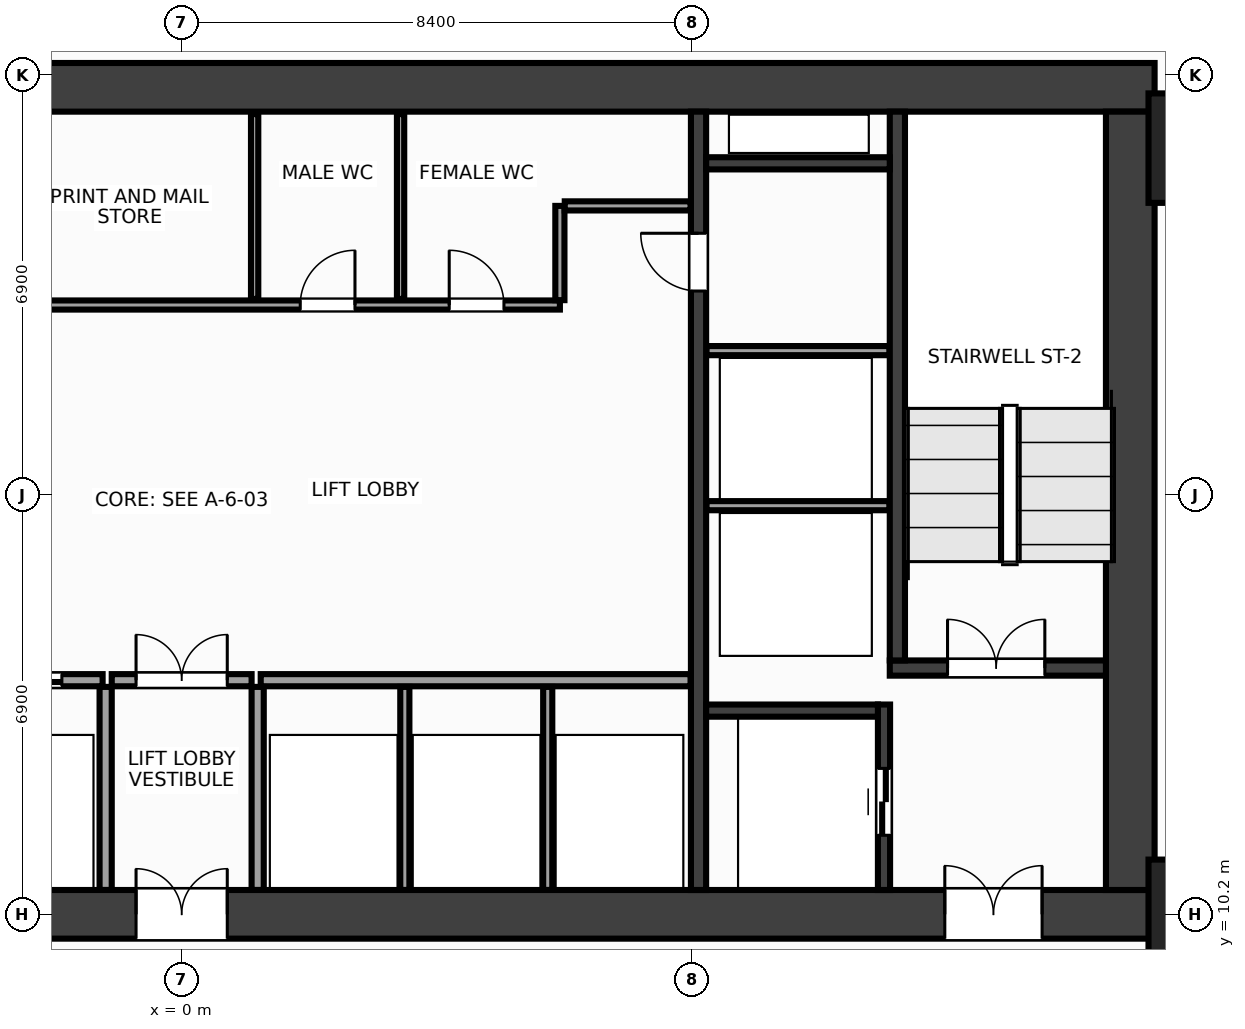
"""IFC4 building model, lengths in metres.
Left out: names, types, materials, properties, quantities, classifications, styles, units other than length and angle.
Written with IfcOpenShell. Run it as: python <this file> out.ifc"""

import sys

from ifc_helpers import new_model, si_unit, direction, frame, frame_2d, origin, origin_2d, place, context, subcontext, project, spatial, rectangle, extrude, source, transform, mapped, element, fill, save


model = new_model("IFC4")
c1 = context("Model", 3, precision=1e-05, world=origin(), true_north=direction((0.0, 1.0)))
c2 = subcontext(c1, "Body", "Model", "MODEL_VIEW")
j1 = project(units=[si_unit("LENGTHUNIT", "METRE"), si_unit("PLANEANGLEUNIT", "RADIAN")], contexts=[c1])
p1 = place(None, origin())
s1 = spatial("IfcSite", under=j1, at=p1, CompositionType="ELEMENT")
p2 = place(p1, origin())
s2 = spatial("IfcBuilding", under=s1, at=p2, CompositionType="ELEMENT")
p3 = place(p2, frame((0.0, 0.0, 45.2)))
s3 = spatial("IfcBuildingStorey", under=s2, at=p3, CompositionType="ELEMENT", Elevation=45.2)
m1 = source(origin(), c2, "Body", "SweptSolid", [
    extrude(rectangle(XDim=32.0, YDim=0.8, at=frame_2d((16.0, 0.0))), origin(), (0.0, 0.0, 1.0), 3.6),
])
p4 = place(p3, frame((-16.0, 23.8, 0.0), z_axis=(0.0, 0.0, 1.0), x_axis=(1.0, 0.0, 0.0)))
e1 = element("IfcWall", 1, at=p4, inside=s3, PredefinedType="SHEAR", context=c2, shape_type="MappedRepresentation", body=[
    mapped(m1, transform((0.0, 0.0, 0.0), x_axis=(1.0, 0.0, 0.0), y_axis=(0.0, 1.0, 0.0), z_axis=(0.0, 0.0, 1.0), scale=1.0)),
])
p5 = place(p3, frame((-16.0, 10.2, 0.0), z_axis=(0.0, 0.0, 1.0), x_axis=(1.0, 0.0, 0.0)))
e2 = element("IfcWall", 2, at=p5, inside=s3, PredefinedType="SHEAR", context=c2, shape_type="MappedRepresentation", body=[
    mapped(m1, transform((0.0, 0.0, 0.0), x_axis=(1.0, 0.0, 0.0), y_axis=(0.0, 1.0, 0.0), z_axis=(0.0, 0.0, 1.0), scale=1.0)),
])
p6 = place(p5, frame((1.85, 0.0, 0.0)))
e3 = element("IfcOpeningElement", 3, at=p6, cuts=e2, PredefinedType="OPENING", context=c2, shape_type="SweptSolid", body=[
    extrude(rectangle(XDim=1.6, YDim=2.15, at=frame_2d((0.8, 1.075))), frame((0.0, 0.412, 0.0), z_axis=(0.0, -1.0, 0.0), x_axis=(1.0, 0.0, 0.0)), (0.0, 0.0, 1.0), 0.824),
])
p7 = place(p5, frame((28.55, 0.0, 0.0)))
e4 = element("IfcOpeningElement", 4, at=p7, cuts=e2, PredefinedType="OPENING", context=c2, shape_type="SweptSolid", body=[
    extrude(rectangle(XDim=1.6, YDim=2.15, at=frame_2d((0.8, 1.075))), frame((0.0, 0.412, 0.0), z_axis=(0.0, -1.0, 0.0), x_axis=(1.0, 0.0, 0.0)), (0.0, 0.0, 1.0), 0.824),
])
p8 = place(p5, frame((15.25, 0.0, 0.0)))
e5 = element("IfcOpeningElement", 5, at=p8, cuts=e2, PredefinedType="OPENING", context=c2, shape_type="SweptSolid", body=[
    extrude(rectangle(XDim=1.5, YDim=2.2, at=frame_2d((0.75, 1.1))), frame((0.0, 0.412, 0.0), z_axis=(0.0, -1.0, 0.0), x_axis=(1.0, 0.0, 0.0)), (0.0, 0.0, 1.0), 0.824),
])
m2 = source(origin(), c2, "Body", "SweptSolid", [
    extrude(rectangle(XDim=12.8, YDim=0.8, at=frame_2d((6.4, 0.0))), origin(), (0.0, 0.0, 1.0), 3.6),
])
p9 = place(p3, frame((15.6, 10.6, 0.0), z_axis=(0.0, 0.0, 1.0), x_axis=(0.0, 1.0, 0.0)))
e6 = element("IfcWall", 6, at=p9, inside=s3, PredefinedType="SHEAR", context=c2, shape_type="MappedRepresentation", body=[
    mapped(m2, transform((0.0, 0.0, 0.0), x_axis=(1.0, 0.0, 0.0), y_axis=(0.0, 1.0, 0.0), z_axis=(0.0, 0.0, 1.0), scale=1.0)),
])
m3 = source(origin(), c2, "Body", "SweptSolid", [
    extrude(rectangle(XDim=12.8, YDim=0.25, at=frame_2d((6.4, 0.0))), origin(), (0.0, 0.0, 1.0), 3.6),
])
p10 = place(p3, frame((8.5, 10.6, 0.0), z_axis=(0.0, 0.0, 1.0), x_axis=(0.0, 1.0, 0.0)))
e7 = element("IfcWall", 7, at=p10, inside=s3, PredefinedType="SHEAR", context=c2, shape_type="MappedRepresentation", body=[
    mapped(m3, transform((0.0, 0.0, 0.0), x_axis=(1.0, 0.0, 0.0), y_axis=(0.0, 1.0, 0.0), z_axis=(0.0, 0.0, 1.0), scale=1.0)),
])
p11 = place(p10, frame((9.85, 0.0, 0.0)))
e8 = element("IfcOpeningElement", 8, at=p11, cuts=e7, PredefinedType="OPENING", context=c2, shape_type="SweptSolid", body=[
    extrude(rectangle(XDim=0.95, YDim=2.15, at=frame_2d((0.475, 1.075))), frame((0.0, 0.137, 0.0), z_axis=(0.0, -1.0, 0.0), x_axis=(1.0, 0.0, 0.0)), (0.0, 0.0, 1.0), 0.274),
])
m4 = source(origin(), c2, "Body", "SweptSolid", [
    extrude(rectangle(XDim=3.555, YDim=0.25, at=frame_2d((1.777, 0.0))), origin(), (0.0, 0.0, 1.0), 3.6),
])
p12 = place(p3, frame((11.645, 14.25, 0.0), z_axis=(0.0, 0.0, 1.0), x_axis=(1.0, 0.0, 0.0)))
e9 = element("IfcWall", 9, at=p12, inside=s3, PredefinedType="SHEAR", context=c2, shape_type="MappedRepresentation", body=[
    mapped(m4, transform((0.0, 0.0, 0.0), x_axis=(1.0, 0.0, 0.0), y_axis=(0.0, 1.0, 0.0), z_axis=(0.0, 0.0, 1.0), scale=1.0)),
])
p13 = place(p12, frame((0.95, 0.0, 0.0)))
e10 = element("IfcOpeningElement", 10, at=p13, cuts=e9, PredefinedType="OPENING", context=c2, shape_type="SweptSolid", body=[
    extrude(rectangle(XDim=1.6, YDim=2.15, at=frame_2d((0.8, 1.075))), frame((0.0, 0.137, 0.0), z_axis=(0.0, -1.0, 0.0), x_axis=(1.0, 0.0, 0.0)), (0.0, 0.0, 1.0), 0.274),
])
m5 = source(origin(), c2, "Body", "SweptSolid", [
    extrude(rectangle(XDim=9.025, YDim=0.25, at=frame_2d((4.512, 0.0))), origin(), (0.0, 0.0, 1.0), 3.6),
])
p14 = place(p3, frame((11.77, 14.375, 0.0), z_axis=(0.0, 0.0, 1.0), x_axis=(0.0, 1.0, 0.0)))
e11 = element("IfcWall", 11, at=p14, inside=s3, PredefinedType="SHEAR", context=c2, shape_type="MappedRepresentation", body=[
    mapped(m5, transform((0.0, 0.0, 0.0), x_axis=(1.0, 0.0, 0.0), y_axis=(0.0, 1.0, 0.0), z_axis=(0.0, 0.0, 1.0), scale=1.0)),
])
m6 = source(origin(), c2, "Body", "SweptSolid", [
    extrude(rectangle(XDim=3.05, YDim=0.2, at=frame_2d((1.525, 0.0))), origin(), (0.0, 0.0, 1.0), 3.6),
])
p15 = place(p3, frame((11.55, 10.6, 0.0), z_axis=(0.0, 0.0, 1.0), x_axis=(0.0, 1.0, 0.0)))
e12 = element("IfcWall", 12, at=p15, inside=s3, PredefinedType="SHEAR", context=c2, shape_type="MappedRepresentation", body=[
    mapped(m6, transform((0.0, 0.0, 0.0), x_axis=(1.0, 0.0, 0.0), y_axis=(0.0, 1.0, 0.0), z_axis=(0.0, 0.0, 1.0), scale=1.0)),
])
p16 = place(p15, frame((0.9, 0.0, 0.0)))
e13 = element("IfcOpeningElement", 13, at=p16, cuts=e12, PredefinedType="OPENING", context=c2, shape_type="SweptSolid", body=[
    extrude(rectangle(XDim=1.1, YDim=2.15, at=frame_2d((0.55, 1.075))), frame((0.0, 0.112, 0.0), z_axis=(0.0, -1.0, 0.0), x_axis=(1.0, 0.0, 0.0)), (0.0, 0.0, 1.0), 0.224),
])
m7 = source(origin(), c2, "Body", "SweptSolid", [
    extrude(rectangle(XDim=2.825, YDim=0.2, at=frame_2d((1.413, 0.0))), origin(), (0.0, 0.0, 1.0), 3.6),
])
p17 = place(p3, frame((8.625, 13.55, 0.0), z_axis=(0.0, 0.0, 1.0), x_axis=(1.0, 0.0, 0.0)))
e14 = element("IfcWall", 14, at=p17, inside=s3, PredefinedType="SHEAR", context=c2, shape_type="MappedRepresentation", body=[
    mapped(m7, transform((0.0, 0.0, 0.0), x_axis=(1.0, 0.0, 0.0), y_axis=(0.0, 1.0, 0.0), z_axis=(0.0, 0.0, 1.0), scale=1.0)),
])
m8 = source(origin(), c2, "Body", "SweptSolid", [
    extrude(rectangle(XDim=3.02, YDim=0.2, at=frame_2d((1.51, 0.0))), origin(), (0.0, 0.0, 1.0), 3.6),
])
p18 = place(p3, frame((8.625, 22.55, 0.0), z_axis=(0.0, 0.0, 1.0), x_axis=(1.0, 0.0, 0.0)))
e15 = element("IfcWall", 15, at=p18, inside=s3, PredefinedType="SHEAR", context=c2, shape_type="MappedRepresentation", body=[
    mapped(m8, transform((0.0, 0.0, 0.0), x_axis=(1.0, 0.0, 0.0), y_axis=(0.0, 1.0, 0.0), z_axis=(0.0, 0.0, 1.0), scale=1.0)),
])
m9 = source(origin(), c2, "Body", "SweptSolid", [
    extrude(rectangle(XDim=1.8, YDim=1.8, at=origin_2d()), origin(), (0.0, 0.0, 1.0), 3.6),
])
for number, where, z_axis, x_axis in (
    (16, (16.8, 10.2, 0.0), (0.0, 0.0, 1.0), (1.0, 0.0, 0.0)),
    (17, (16.8, 22.8, 0.0), (0.0, 0.0, 1.0), (1.0, 0.0, 0.0)),
):
    element("IfcColumn", number, at=place(p3, frame(where, z_axis=z_axis, x_axis=x_axis)), inside=s3, PredefinedType="COLUMN", context=c2, shape_type="MappedRepresentation", body=[
        mapped(m9, transform((0.0, 0.0, 0.0), x_axis=(1.0, 0.0, 0.0), y_axis=(0.0, 1.0, 0.0), z_axis=(0.0, 0.0, 1.0), scale=1.0)),
    ])
m10 = source(origin(), c2, "Body", "SweptSolid", [
    extrude(rectangle(XDim=3.01, YDim=0.15, at=frame_2d((1.505, 0.0))), origin(), (0.0, 0.0, 1.0), 3.36),
])
for number, where, z_axis, x_axis in (
    (18, (8.63, 16.92, 0.0), (0.0, 0.0, 1.0), (1.0, 0.0, 0.0)),
    (19, (8.63, 19.47, 0.0), (0.0, 0.0, 1.0), (1.0, 0.0, 0.0)),
):
    element("IfcWall", number, at=place(p3, frame(where, z_axis=z_axis, x_axis=x_axis)), inside=s3, PredefinedType="PARTITIONING", context=c2, shape_type="MappedRepresentation", body=[
        mapped(m10, transform((0.0, 0.0, 0.0), x_axis=(1.0, 0.0, 0.0), y_axis=(0.0, 1.0, 0.0), z_axis=(0.0, 0.0, 1.0), scale=1.0)),
    ])
m11 = source(origin(), c2, "Body", "SweptSolid", [
    extrude(rectangle(XDim=7.07, YDim=0.2, at=frame_2d((3.535, 0.0))), origin(), (0.0, 0.0, 1.0), 3.36),
])
p19 = place(p3, frame((-8.37, 14.05, 0.0), z_axis=(0.0, 0.0, 1.0), x_axis=(1.0, 0.0, 0.0)))
e20 = element("IfcWall", 20, at=p19, inside=s3, PredefinedType="PARTITIONING", context=c2, shape_type="MappedRepresentation", body=[
    mapped(m11, transform((0.0, 0.0, 0.0), x_axis=(1.0, 0.0, 0.0), y_axis=(0.0, 1.0, 0.0), z_axis=(0.0, 0.0, 1.0), scale=1.0)),
])
p20 = place(p19, frame((0.6, 0.0, 0.0)))
e21 = element("IfcOpeningElement", 21, at=p20, cuts=e20, PredefinedType="OPENING", context=c2, shape_type="SweptSolid", body=[
    extrude(rectangle(XDim=1.1, YDim=2.15, at=frame_2d((0.55, 1.075))), frame((0.0, 0.112, 0.0), z_axis=(0.0, -1.0, 0.0), x_axis=(1.0, 0.0, 0.0)), (0.0, 0.0, 1.0), 0.224),
])
p21 = place(p19, frame((2.95, 0.0, 0.0)))
e22 = element("IfcOpeningElement", 22, at=p21, cuts=e20, PredefinedType="OPENING", context=c2, shape_type="SweptSolid", body=[
    extrude(rectangle(XDim=1.1, YDim=2.15, at=frame_2d((0.55, 1.075))), frame((0.0, 0.112, 0.0), z_axis=(0.0, -1.0, 0.0), x_axis=(1.0, 0.0, 0.0)), (0.0, 0.0, 1.0), 0.224),
])
p22 = place(p19, frame((5.3, 0.0, 0.0)))
e23 = element("IfcOpeningElement", 23, at=p22, cuts=e20, PredefinedType="OPENING", context=c2, shape_type="SweptSolid", body=[
    extrude(rectangle(XDim=1.1, YDim=2.15, at=frame_2d((0.55, 1.075))), frame((0.0, 0.112, 0.0), z_axis=(0.0, -1.0, 0.0), x_axis=(1.0, 0.0, 0.0)), (0.0, 0.0, 1.0), 0.224),
])
p23 = place(p3, frame((1.3, 14.05, 0.0), z_axis=(0.0, 0.0, 1.0), x_axis=(1.0, 0.0, 0.0)))
e24 = element("IfcWall", 24, at=p23, inside=s3, PredefinedType="PARTITIONING", context=c2, shape_type="MappedRepresentation", body=[
    mapped(m11, transform((0.0, 0.0, 0.0), x_axis=(1.0, 0.0, 0.0), y_axis=(0.0, 1.0, 0.0), z_axis=(0.0, 0.0, 1.0), scale=1.0)),
])
m12 = source(origin(), c2, "Body", "SweptSolid", [
    extrude(rectangle(XDim=3.34, YDim=0.2, at=frame_2d((1.67, 0.0))), origin(), (0.0, 0.0, 1.0), 3.36),
])
for number, where, z_axis, x_axis in (
    (25, (-1.25, 10.6, 0.0), (0.0, 0.0, 1.0), (0.0, 1.0, 0.0)),
    (26, (1.25, 10.6, 0.0), (0.0, 0.0, 1.0), (0.0, 1.0, 0.0)),
):
    element("IfcWall", number, at=place(p3, frame(where, z_axis=z_axis, x_axis=x_axis)), inside=s3, PredefinedType="PARTITIONING", context=c2, shape_type="MappedRepresentation", body=[
        mapped(m12, transform((0.0, 0.0, 0.0), x_axis=(1.0, 0.0, 0.0), y_axis=(0.0, 1.0, 0.0), z_axis=(0.0, 0.0, 1.0), scale=1.0)),
    ])
m13 = source(origin(), c2, "Body", "SweptSolid", [
    extrude(rectangle(XDim=2.3, YDim=0.2, at=frame_2d((1.15, 0.0))), origin(), (0.0, 0.0, 1.0), 3.36),
])
p24 = place(p3, frame((-1.15, 14.05, 0.0), z_axis=(0.0, 0.0, 1.0), x_axis=(1.0, 0.0, 0.0)))
e27 = element("IfcWall", 27, at=p24, inside=s3, PredefinedType="PARTITIONING", context=c2, shape_type="MappedRepresentation", body=[
    mapped(m13, transform((0.0, 0.0, 0.0), x_axis=(1.0, 0.0, 0.0), y_axis=(0.0, 1.0, 0.0), z_axis=(0.0, 0.0, 1.0), scale=1.0)),
])
p25 = place(p24, frame((0.4, 0.0, 0.0)))
e28 = element("IfcOpeningElement", 28, at=p25, cuts=e27, PredefinedType="OPENING", context=c2, shape_type="SweptSolid", body=[
    extrude(rectangle(XDim=1.5, YDim=2.2, at=frame_2d((0.75, 1.1))), frame((0.0, 0.112, 0.0), z_axis=(0.0, -1.0, 0.0), x_axis=(1.0, 0.0, 0.0)), (0.0, 0.0, 1.0), 0.224),
])
m14 = source(origin(), c2, "Body", "SweptSolid", [
    extrude(rectangle(XDim=14.59, YDim=0.15, at=frame_2d((7.295, 0.0))), origin(), (0.0, 0.0, 1.0), 3.36),
])
p26 = place(p3, frame((-8.37, 20.22, 0.0), z_axis=(0.0, 0.0, 1.0), x_axis=(1.0, 0.0, 0.0)))
e29 = element("IfcWall", 29, at=p26, inside=s3, PredefinedType="PARTITIONING", context=c2, shape_type="MappedRepresentation", body=[
    mapped(m14, transform((0.0, 0.0, 0.0), x_axis=(1.0, 0.0, 0.0), y_axis=(0.0, 1.0, 0.0), z_axis=(0.0, 0.0, 1.0), scale=1.0)),
])
p27 = place(p26, frame((4.36, 0.0, 0.0)))
e30 = element("IfcOpeningElement", 30, at=p27, cuts=e29, PredefinedType="OPENING", context=c2, shape_type="SweptSolid", body=[
    extrude(rectangle(XDim=0.9, YDim=2.15, at=frame_2d((0.45, 1.075))), frame((0.0, 0.087, 0.0), z_axis=(0.0, -1.0, 0.0), x_axis=(1.0, 0.0, 0.0)), (0.0, 0.0, 1.0), 0.174),
])
p28 = place(p26, frame((10.32, 0.0, 0.0)))
e31 = element("IfcOpeningElement", 31, at=p28, cuts=e29, PredefinedType="OPENING", context=c2, shape_type="SweptSolid", body=[
    extrude(rectangle(XDim=0.9, YDim=2.15, at=frame_2d((0.45, 1.075))), frame((0.0, 0.087, 0.0), z_axis=(0.0, -1.0, 0.0), x_axis=(1.0, 0.0, 0.0)), (0.0, 0.0, 1.0), 0.174),
])
p29 = place(p26, frame((12.77, 0.0, 0.0)))
e32 = element("IfcOpeningElement", 32, at=p29, cuts=e29, PredefinedType="OPENING", context=c2, shape_type="SweptSolid", body=[
    extrude(rectangle(XDim=0.9, YDim=2.15, at=frame_2d((0.45, 1.075))), frame((0.0, 0.087, 0.0), z_axis=(0.0, -1.0, 0.0), x_axis=(1.0, 0.0, 0.0)), (0.0, 0.0, 1.0), 0.174),
])
m15 = source(origin(), c2, "Body", "SweptSolid", [
    extrude(rectangle(XDim=1.55, YDim=0.15, at=frame_2d((0.775, 0.0))), origin(), (0.0, 0.0, 1.0), 3.36),
])
p30 = place(p3, frame((6.22, 20.3, 0.0), z_axis=(0.0, 0.0, 1.0), x_axis=(0.0, 1.0, 0.0)))
e33 = element("IfcWall", 33, at=p30, inside=s3, PredefinedType="PARTITIONING", context=c2, shape_type="MappedRepresentation", body=[
    mapped(m15, transform((0.0, 0.0, 0.0), x_axis=(1.0, 0.0, 0.0), y_axis=(0.0, 1.0, 0.0), z_axis=(0.0, 0.0, 1.0), scale=1.0)),
])
m16 = source(origin(), c2, "Body", "SweptSolid", [
    extrude(rectangle(XDim=2.07, YDim=0.15, at=frame_2d((1.035, 0.0))), origin(), (0.0, 0.0, 1.0), 3.36),
])
p31 = place(p3, frame((6.3, 21.85, 0.0), z_axis=(0.0, 0.0, 1.0), x_axis=(1.0, 0.0, 0.0)))
e34 = element("IfcWall", 34, at=p31, inside=s3, PredefinedType="PARTITIONING", context=c2, shape_type="MappedRepresentation", body=[
    mapped(m16, transform((0.0, 0.0, 0.0), x_axis=(1.0, 0.0, 0.0), y_axis=(0.0, 1.0, 0.0), z_axis=(0.0, 0.0, 1.0), scale=1.0)),
])
m17 = source(origin(), c2, "Body", "SweptSolid", [
    extrude(rectangle(XDim=3.34, YDim=0.15, at=frame_2d((1.67, 0.0))), origin(), (0.0, 0.0, 1.0), 3.36),
])
for number, where, z_axis, x_axis in (
    (35, (3.67, 10.6, 0.0), (0.0, 0.0, 1.0), (0.0, 1.0, 0.0)),
    (36, (6.02, 10.6, 0.0), (0.0, 0.0, 1.0), (0.0, 1.0, 0.0)),
):
    element("IfcWall", number, at=place(p3, frame(where, z_axis=z_axis, x_axis=x_axis)), inside=s3, PredefinedType="PARTITIONING", context=c2, shape_type="MappedRepresentation", body=[
        mapped(m17, transform((0.0, 0.0, 0.0), x_axis=(1.0, 0.0, 0.0), y_axis=(0.0, 1.0, 0.0), z_axis=(0.0, 0.0, 1.0), scale=1.0)),
    ])
m18 = source(origin(), c2, "Body", "SweptSolid", [
    extrude(rectangle(XDim=3.04, YDim=0.12, at=frame_2d((1.52, 0.0))), origin(), (0.0, 0.0, 1.0), 3.36),
])
for number, where, z_axis, x_axis in (
    (37, (1.2, 20.32, 0.0), (0.0, 0.0, 1.0), (0.0, 1.0, 0.0)),
    (38, (3.6, 20.32, 0.0), (0.0, 0.0, 1.0), (0.0, 1.0, 0.0)),
):
    element("IfcWall", number, at=place(p3, frame(where, z_axis=z_axis, x_axis=x_axis)), inside=s3, PredefinedType="PARTITIONING", context=c2, shape_type="MappedRepresentation", body=[
        mapped(m18, transform((0.0, 0.0, 0.0), x_axis=(1.0, 0.0, 0.0), y_axis=(0.0, 1.0, 0.0), z_axis=(0.0, 0.0, 1.0), scale=1.0)),
    ])
m19 = source(origin(), c2, "Body", "SweptSolid", [
    extrude(rectangle(XDim=1.6, YDim=2.15, at=frame_2d((0.8, 1.075))), frame((0.0, 0.025, 0.0), z_axis=(0.0, -1.0, 0.0), x_axis=(1.0, 0.0, 0.0)), (0.0, 0.0, 1.0), 0.05),
])
p32 = place(p13, origin())
e39 = element("IfcDoor", 39, at=p32, inside=s3, OperationType="DOUBLE_DOOR_SINGLE_SWING", PredefinedType="DOOR", context=c2, shape_type="MappedRepresentation", body=[
    mapped(m19, transform((0.0, 0.0, 0.0), x_axis=(1.0, 0.0, 0.0), y_axis=(0.0, 1.0, 0.0), z_axis=(0.0, 0.0, 1.0), scale=1.0)),
])
fill(e10, e39)
p33 = place(p7, origin())
e40 = element("IfcDoor", 40, at=p33, inside=s3, OperationType="DOUBLE_DOOR_SINGLE_SWING", PredefinedType="DOOR", context=c2, shape_type="MappedRepresentation", body=[
    mapped(m19, transform((0.0, 0.0, 0.0), x_axis=(1.0, 0.0, 0.0), y_axis=(0.0, 1.0, 0.0), z_axis=(0.0, 0.0, 1.0), scale=1.0)),
])
fill(e4, e40)
m20 = source(origin(), c2, "Body", "SweptSolid", [
    extrude(rectangle(XDim=1.1, YDim=2.15, at=frame_2d((0.55, 1.075))), frame((0.0, 0.025, 0.0), z_axis=(0.0, -1.0, 0.0), x_axis=(1.0, 0.0, 0.0)), (0.0, 0.0, 1.0), 0.05),
])
p34 = place(p16, origin())
e41 = element("IfcDoor", 41, at=p34, inside=s3, OperationType="DOUBLE_DOOR_SLIDING", PredefinedType="DOOR", context=c2, shape_type="MappedRepresentation", body=[
    mapped(m20, transform((0.0, 0.0, 0.0), x_axis=(1.0, 0.0, 0.0), y_axis=(0.0, 1.0, 0.0), z_axis=(0.0, 0.0, 1.0), scale=1.0)),
])
fill(e13, e41)
m21 = source(origin(), c2, "Body", "SweptSolid", [
    extrude(rectangle(XDim=0.95, YDim=2.15, at=frame_2d((0.475, 1.075))), frame((0.0, 0.025, 0.0), z_axis=(0.0, -1.0, 0.0), x_axis=(1.0, 0.0, 0.0)), (0.0, 0.0, 1.0), 0.05),
])
p35 = place(p11, origin())
e42 = element("IfcDoor", 42, at=p35, inside=s3, OperationType="SINGLE_SWING_RIGHT", PredefinedType="DOOR", context=c2, shape_type="MappedRepresentation", body=[
    mapped(m21, transform((0.0, 0.0, 0.0), x_axis=(1.0, 0.0, 0.0), y_axis=(0.0, 1.0, 0.0), z_axis=(0.0, 0.0, 1.0), scale=1.0)),
])
fill(e8, e42)
p36 = place(p22, origin())
e43 = element("IfcDoor", 43, at=p36, inside=s3, OperationType="DOUBLE_DOOR_SLIDING", PredefinedType="DOOR", context=c2, shape_type="MappedRepresentation", body=[
    mapped(m20, transform((0.0, 0.0, 0.0), x_axis=(1.0, 0.0, 0.0), y_axis=(0.0, 1.0, 0.0), z_axis=(0.0, 0.0, 1.0), scale=1.0)),
])
fill(e23, e43)
m22 = source(origin(), c2, "Body", "SweptSolid", [
    extrude(rectangle(XDim=1.5, YDim=2.2, at=frame_2d((0.75, 1.1))), frame((0.0, 0.025, 0.0), z_axis=(0.0, -1.0, 0.0), x_axis=(1.0, 0.0, 0.0)), (0.0, 0.0, 1.0), 0.05),
])
p37 = place(p25, origin())
e44 = element("IfcDoor", 44, at=p37, inside=s3, OperationType="DOUBLE_DOOR_SINGLE_SWING", PredefinedType="DOOR", context=c2, shape_type="MappedRepresentation", body=[
    mapped(m22, transform((0.0, 0.0, 0.0), x_axis=(1.0, 0.0, 0.0), y_axis=(0.0, 1.0, 0.0), z_axis=(0.0, 0.0, 1.0), scale=1.0)),
])
fill(e28, e44)
p38 = place(p8, origin())
e45 = element("IfcDoor", 45, at=p38, inside=s3, OperationType="DOUBLE_DOOR_SINGLE_SWING", PredefinedType="DOOR", context=c2, shape_type="MappedRepresentation", body=[
    mapped(m22, transform((0.0, 0.0, 0.0), x_axis=(1.0, 0.0, 0.0), y_axis=(0.0, 1.0, 0.0), z_axis=(0.0, 0.0, 1.0), scale=1.0)),
])
fill(e5, e45)
m23 = source(origin(), c2, "Body", "SweptSolid", [
    extrude(rectangle(XDim=0.9, YDim=2.15, at=frame_2d((0.45, 1.075))), frame((0.0, 0.025, 0.0), z_axis=(0.0, -1.0, 0.0), x_axis=(1.0, 0.0, 0.0)), (0.0, 0.0, 1.0), 0.05),
])
p39 = place(p28, origin())
e46 = element("IfcDoor", 46, at=p39, inside=s3, OperationType="SINGLE_SWING_RIGHT", PredefinedType="DOOR", context=c2, shape_type="MappedRepresentation", body=[
    mapped(m23, transform((0.0, 0.0, 0.0), x_axis=(1.0, 0.0, 0.0), y_axis=(0.0, 1.0, 0.0), z_axis=(0.0, 0.0, 1.0), scale=1.0)),
])
fill(e31, e46)
p40 = place(p29, origin())
e47 = element("IfcDoor", 47, at=p40, inside=s3, OperationType="SINGLE_SWING_LEFT", PredefinedType="DOOR", context=c2, shape_type="MappedRepresentation", body=[
    mapped(m23, transform((0.0, 0.0, 0.0), x_axis=(1.0, 0.0, 0.0), y_axis=(0.0, 1.0, 0.0), z_axis=(0.0, 0.0, 1.0), scale=1.0)),
])
fill(e32, e47)
save(model, sys.argv[1])
